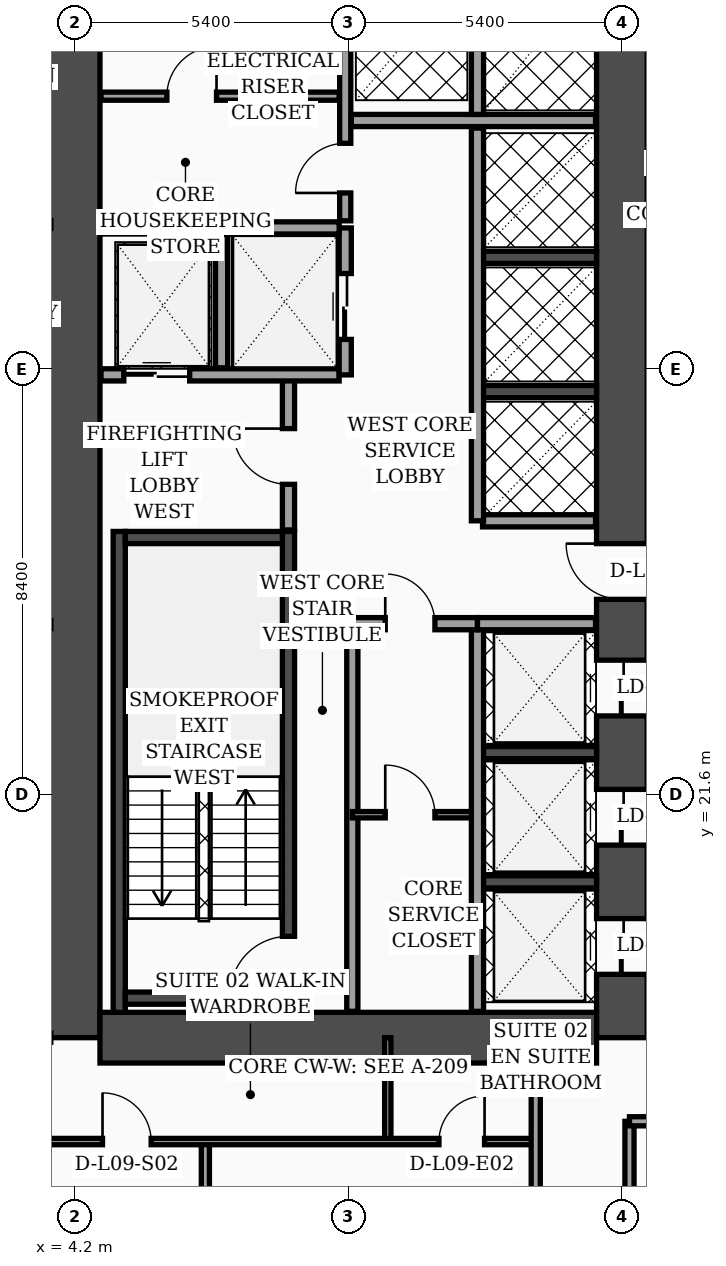
"""IFC4 building model, lengths in metres.
Left out: names, types, materials, properties, quantities, classifications, styles, units other than length and angle.
Written with IfcOpenShell. Run it as: python <this file> out.ifc"""

import sys

from ifc_helpers import new_model, si_unit, direction, frame, frame_2d, origin, place, context, subcontext, project, spatial, rectangle, extrude, element, fill, save


model = new_model("IFC4")
c1 = context("Model", 3, precision=1e-05, world=origin(), true_north=direction((0.0, 1.0)))
c2 = subcontext(c1, "Body", "Model", "MODEL_VIEW")
j1 = project(units=[si_unit("LENGTHUNIT", "METRE"), si_unit("PLANEANGLEUNIT", "RADIAN")], contexts=[c1])
p1 = place(None, origin())
s1 = spatial("IfcSite", under=j1, at=p1, CompositionType="ELEMENT")
p2 = place(p1, origin())
s2 = spatial("IfcBuilding", under=s1, at=p2, CompositionType="ELEMENT")
p3 = place(p2, frame((0.0, 0.0, 42.2)))
s3 = spatial("IfcBuildingStorey", under=s2, at=p3, CompositionType="ELEMENT", Elevation=42.2)
p4 = place(p3, frame((4.2, 16.8, 0.0), z_axis=(0.0, 0.0, 1.0), x_axis=(0.0, 1.0, 0.0)))
e1 = element("IfcWall", 1, at=p4, inside=s3, PredefinedType="SHEAR", context=c2, shape_type="SweptSolid", body=[
    extrude(rectangle(XDim=21.6, YDim=1.0, at=frame_2d((10.8, 0.0))), origin(), (0.0, 0.0, 1.0), 3.52),
])
p5 = place(p3, frame((15.0, 16.8, 0.0), z_axis=(0.0, 0.0, 1.0), x_axis=(0.0, 1.0, 0.0)))
e2 = element("IfcWall", 2, at=p5, inside=s3, PredefinedType="SHEAR", context=c2, shape_type="SweptSolid", body=[
    extrude(rectangle(XDim=21.6, YDim=1.0, at=frame_2d((10.8, 0.0))), origin(), (0.0, 0.0, 1.0), 3.52),
])
p6 = place(p5, frame((8.65, 0.0, 0.0)))
e3 = element("IfcOpeningElement", 3, at=p6, cuts=e2, PredefinedType="OPENING", context=c2, shape_type="SweptSolid", body=[
    extrude(rectangle(XDim=1.1, YDim=2.2, at=frame_2d((0.55, 1.1))), frame((0.0, 0.51, 0.0), z_axis=(0.0, -1.0, 0.0), x_axis=(1.0, 0.0, 0.0)), (0.0, 0.0, 1.0), 1.02),
])
p7 = place(p5, frame((1.25, 0.0, 0.0)))
e4 = element("IfcOpeningElement", 4, at=p7, cuts=e2, PredefinedType="OPENING", context=c2, shape_type="SweptSolid", body=[
    extrude(rectangle(XDim=1.1, YDim=2.2, at=frame_2d((0.55, 1.1))), frame((0.0, 0.51, 0.0), z_axis=(0.0, -1.0, 0.0), x_axis=(1.0, 0.0, 0.0)), (0.0, 0.0, 1.0), 1.02),
])
p8 = place(p5, frame((3.8, 0.0, 0.0)))
e5 = element("IfcOpeningElement", 5, at=p8, cuts=e2, PredefinedType="OPENING", context=c2, shape_type="SweptSolid", body=[
    extrude(rectangle(XDim=1.1, YDim=2.2, at=frame_2d((0.55, 1.1))), frame((0.0, 0.51, 0.0), z_axis=(0.0, -1.0, 0.0), x_axis=(1.0, 0.0, 0.0)), (0.0, 0.0, 1.0), 1.02),
])
p9 = place(p5, frame((6.35, 0.0, 0.0)))
e6 = element("IfcOpeningElement", 6, at=p9, cuts=e2, PredefinedType="OPENING", context=c2, shape_type="SweptSolid", body=[
    extrude(rectangle(XDim=1.1, YDim=2.2, at=frame_2d((0.55, 1.1))), frame((0.0, 0.51, 0.0), z_axis=(0.0, -1.0, 0.0), x_axis=(1.0, 0.0, 0.0)), (0.0, 0.0, 1.0), 1.02),
])
p10 = place(p3, frame((4.7, 16.8, 0.0), z_axis=(0.0, 0.0, 1.0), x_axis=(1.0, 0.0, 0.0)))
e7 = element("IfcWall", 7, at=p10, inside=s3, PredefinedType="SHEAR", context=c2, shape_type="SweptSolid", body=[
    extrude(rectangle(XDim=9.8, YDim=1.0, at=frame_2d((4.9, 0.0))), origin(), (0.0, 0.0, 1.0), 3.52),
])
p11 = place(p3, frame((5.08, 17.3, 0.0), z_axis=(0.0, 0.0, 1.0), x_axis=(0.0, 1.0, 0.0)))
e8 = element("IfcWall", 8, at=p11, inside=s3, PredefinedType="SOLIDWALL", context=c2, shape_type="SweptSolid", body=[
    extrude(rectangle(XDim=9.49, YDim=0.24, at=frame_2d((4.745, 0.0))), origin(), (0.0, 0.0, 1.0), 3.52),
])
p12 = place(p3, frame((8.42, 17.3, 0.0), z_axis=(0.0, 0.0, 1.0), x_axis=(0.0, 1.0, 0.0)))
e9 = element("IfcWall", 9, at=p12, inside=s3, PredefinedType="SOLIDWALL", context=c2, shape_type="SweptSolid", body=[
    extrude(rectangle(XDim=9.49, YDim=0.24, at=frame_2d((4.745, 0.0))), origin(), (0.0, 0.0, 1.0), 3.52),
])
p13 = place(p12, frame((0.35, 0.0, 0.0)))
e10 = element("IfcOpeningElement", 10, at=p13, cuts=e9, PredefinedType="OPENING", context=c2, shape_type="SweptSolid", body=[
    extrude(rectangle(XDim=1.15, YDim=2.2, at=frame_2d((0.575, 1.1))), frame((0.0, 0.13, 0.0), z_axis=(0.0, -1.0, 0.0), x_axis=(1.0, 0.0, 0.0)), (0.0, 0.0, 1.0), 0.26),
])
for number, where, z_axis, x_axis in (
    (11, (5.2, 17.58, 0.0), (0.0, 0.0, 1.0), (1.0, 0.0, 0.0)),
    (12, (5.2, 26.67, 0.0), (0.0, 0.0, 1.0), (1.0, 0.0, 0.0)),
):
    element("IfcWall", number, at=place(p3, frame(where, z_axis=z_axis, x_axis=x_axis)), inside=s3, PredefinedType="SOLIDWALL", context=c2, shape_type="SweptSolid", body=[
        extrude(rectangle(XDim=3.1, YDim=0.24, at=frame_2d((1.55, 0.0))), origin(), (0.0, 0.0, 1.0), 3.52),
    ])
for number, where, z_axis, x_axis in (
    (13, (12.18, 19.875, 0.0), (0.0, 0.0, 1.0), (1.0, 0.0, 0.0)),
    (14, (12.18, 22.425, 0.0), (0.0, 0.0, 1.0), (1.0, 0.0, 0.0)),
    (15, (12.18, 29.55, 0.0), (0.0, 0.0, 1.0), (1.0, 0.0, 0.0)),
    (16, (12.18, 32.2, 0.0), (0.0, 0.0, 1.0), (1.0, 0.0, 0.0)),
):
    element("IfcWall", number, at=place(p3, frame(where, z_axis=z_axis, x_axis=x_axis)), inside=s3, PredefinedType="SOLIDWALL", context=c2, shape_type="SweptSolid", body=[
        extrude(rectangle(XDim=2.32, YDim=0.24, at=frame_2d((1.16, 0.0))), origin(), (0.0, 0.0, 1.0), 3.52),
    ])
p14 = place(p3, frame((8.42, 26.82, 0.0), z_axis=(0.0, 0.0, 1.0), x_axis=(0.0, 1.0, 0.0)))
e17 = element("IfcWall", 17, at=p14, inside=s3, PredefinedType="SOLIDWALL", context=c2, shape_type="SweptSolid", body=[
    extrude(rectangle(XDim=3.0, YDim=0.24, at=frame_2d((1.5, 0.0))), origin(), (0.0, 0.0, 1.0), 3.52),
])
p15 = place(p14, frame((0.9, 0.0, 0.0)))
e18 = element("IfcOpeningElement", 18, at=p15, cuts=e17, PredefinedType="OPENING", context=c2, shape_type="SweptSolid", body=[
    extrude(rectangle(XDim=1.1, YDim=2.2, at=frame_2d((0.55, 1.1))), frame((0.0, 0.13, 0.0), z_axis=(0.0, -1.0, 0.0), x_axis=(1.0, 0.0, 0.0)), (0.0, 0.0, 1.0), 0.26),
])
p16 = place(p3, frame((4.72, 29.88, 0.0), z_axis=(0.0, 0.0, 1.0), x_axis=(1.0, 0.0, 0.0)))
e19 = element("IfcWall", 19, at=p16, inside=s3, PredefinedType="SOLIDWALL", context=c2, shape_type="SweptSolid", body=[
    extrude(rectangle(XDim=4.7, YDim=0.24, at=frame_2d((2.35, 0.0))), origin(), (0.0, 0.0, 1.0), 3.52),
])
p17 = place(p16, frame((0.45, 0.0, 0.0)))
e20 = element("IfcOpeningElement", 20, at=p17, cuts=e19, PredefinedType="OPENING", context=c2, shape_type="SweptSolid", body=[
    extrude(rectangle(XDim=1.3, YDim=2.35, at=frame_2d((0.65, 1.175))), frame((0.0, 0.13, 0.0), z_axis=(0.0, -1.0, 0.0), x_axis=(1.0, 0.0, 0.0)), (0.0, 0.0, 1.0), 0.26),
])
p18 = place(p3, frame((7.1, 30.02, 0.0), z_axis=(0.0, 0.0, 1.0), x_axis=(0.0, 1.0, 0.0)))
e21 = element("IfcWall", 21, at=p18, inside=s3, PredefinedType="SOLIDWALL", context=c2, shape_type="SweptSolid", body=[
    extrude(rectangle(XDim=2.63, YDim=0.24, at=frame_2d((1.315, 0.0))), origin(), (0.0, 0.0, 1.0), 3.52),
])
p19 = place(p3, frame((9.54, 29.88, 0.0), z_axis=(0.0, 0.0, 1.0), x_axis=(0.0, 1.0, 0.0)))
e22 = element("IfcWall", 22, at=p19, inside=s3, PredefinedType="SOLIDWALL", context=c2, shape_type="SweptSolid", body=[
    extrude(rectangle(XDim=2.9, YDim=0.24, at=frame_2d((1.45, 0.0))), origin(), (0.0, 0.0, 1.0), 3.52),
])
p20 = place(p19, frame((0.7, 0.0, 0.0)))
e23 = element("IfcOpeningElement", 23, at=p20, cuts=e22, PredefinedType="OPENING", context=c2, shape_type="SweptSolid", body=[
    extrude(rectangle(XDim=1.3, YDim=2.35, at=frame_2d((0.65, 1.175))), frame((0.0, 0.13, 0.0), z_axis=(0.0, -1.0, 0.0), x_axis=(1.0, 0.0, 0.0)), (0.0, 0.0, 1.0), 0.26),
])
p21 = place(p3, frame((4.72, 32.78, 0.0), z_axis=(0.0, 0.0, 1.0), x_axis=(1.0, 0.0, 0.0)))
e24 = element("IfcWall", 24, at=p21, inside=s3, PredefinedType="SOLIDWALL", context=c2, shape_type="SweptSolid", body=[
    extrude(rectangle(XDim=4.7, YDim=0.24, at=frame_2d((2.35, 0.0))), origin(), (0.0, 0.0, 1.0), 3.52),
])
p22 = place(p3, frame((9.68, 17.32, 0.0), z_axis=(0.0, 0.0, 1.0), x_axis=(0.0, 1.0, 0.0)))
e25 = element("IfcWall", 25, at=p22, inside=s3, PredefinedType="SOLIDWALL", context=c2, shape_type="SweptSolid", body=[
    extrude(rectangle(XDim=7.68, YDim=0.22, at=frame_2d((3.84, 0.0))), origin(), (0.0, 0.0, 1.0), 3.52),
])
p23 = place(p3, frame((4.72, 35.38, 0.0), z_axis=(0.0, 0.0, 1.0), x_axis=(1.0, 0.0, 0.0)))
e26 = element("IfcWall", 26, at=p23, inside=s3, PredefinedType="PARTITIONING", context=c2, shape_type="SweptSolid", body=[
    extrude(rectangle(XDim=4.7, YDim=0.16, at=frame_2d((2.35, 0.0))), origin(), (0.0, 0.0, 1.0), 3.52),
])
p24 = place(p23, frame((1.3, 0.0, 0.0)))
e27 = element("IfcOpeningElement", 27, at=p24, cuts=e26, PredefinedType="OPENING", context=c2, shape_type="SweptSolid", body=[
    extrude(rectangle(XDim=0.98, YDim=2.15, at=frame_2d((0.49, 1.075))), frame((0.0, 0.09, 0.0), z_axis=(0.0, -1.0, 0.0), x_axis=(1.0, 0.0, 0.0)), (0.0, 0.0, 1.0), 0.18),
])
p25 = place(p3, frame((9.54, 32.92, 0.0), z_axis=(0.0, 0.0, 1.0), x_axis=(0.0, 1.0, 0.0)))
e28 = element("IfcWall", 28, at=p25, inside=s3, PredefinedType="SOLIDWALL", context=c2, shape_type="SweptSolid", body=[
    extrude(rectangle(XDim=4.96, YDim=0.22, at=frame_2d((2.48, 0.0))), origin(), (0.0, 0.0, 1.0), 3.52),
])
p26 = place(p25, frame((0.55, 0.0, 0.0)))
e29 = element("IfcOpeningElement", 29, at=p26, cuts=e28, PredefinedType="OPENING", context=c2, shape_type="SweptSolid", body=[
    extrude(rectangle(XDim=0.98, YDim=2.15, at=frame_2d((0.49, 1.075))), frame((0.0, 0.12, 0.0), z_axis=(0.0, -1.0, 0.0), x_axis=(1.0, 0.0, 0.0)), (0.0, 0.0, 1.0), 0.24),
])
p27 = place(p3, frame((9.68, 21.2, 0.0), z_axis=(0.0, 0.0, 1.0), x_axis=(1.0, 0.0, 0.0)))
e30 = element("IfcWall", 30, at=p27, inside=s3, PredefinedType="PARTITIONING", context=c2, shape_type="SweptSolid", body=[
    extrude(rectangle(XDim=2.47, YDim=0.125, at=frame_2d((1.235, 0.0))), origin(), (0.0, 0.0, 1.0), 3.52),
])
p28 = place(p27, frame((0.65, 0.0, 0.0)))
e31 = element("IfcOpeningElement", 31, at=p28, cuts=e30, PredefinedType="OPENING", context=c2, shape_type="SweptSolid", body=[
    extrude(rectangle(XDim=0.98, YDim=2.15, at=frame_2d((0.49, 1.075))), frame((0.0, 0.073, 0.0), z_axis=(0.0, -1.0, 0.0), x_axis=(1.0, 0.0, 0.0)), (0.0, 0.0, 1.0), 0.145),
])
p29 = place(p3, frame((12.15, 17.32, 0.0), z_axis=(0.0, 0.0, 1.0), x_axis=(0.0, 1.0, 0.0)))
e32 = element("IfcWall", 32, at=p29, inside=s3, PredefinedType="SOLIDWALL", context=c2, shape_type="SweptSolid", body=[
    extrude(rectangle(XDim=7.65, YDim=0.24, at=frame_2d((3.825, 0.0))), origin(), (0.0, 0.0, 1.0), 3.52),
])
p30 = place(p3, frame((9.68, 24.97, 0.0), z_axis=(0.0, 0.0, 1.0), x_axis=(1.0, 0.0, 0.0)))
e33 = element("IfcWall", 33, at=p30, inside=s3, PredefinedType="SOLIDWALL", context=c2, shape_type="SweptSolid", body=[
    extrude(rectangle(XDim=2.47, YDim=0.24, at=frame_2d((1.235, 0.0))), origin(), (0.0, 0.0, 1.0), 3.52),
])
p31 = place(p30, frame((0.65, 0.0, 0.0)))
e34 = element("IfcOpeningElement", 34, at=p31, cuts=e33, PredefinedType="OPENING", context=c2, shape_type="SweptSolid", body=[
    extrude(rectangle(XDim=0.98, YDim=2.15, at=frame_2d((0.49, 1.075))), frame((0.0, 0.13, 0.0), z_axis=(0.0, -1.0, 0.0), x_axis=(1.0, 0.0, 0.0)), (0.0, 0.0, 1.0), 0.26),
])
p32 = place(p3, frame((12.15, 24.97, 0.0), z_axis=(0.0, 0.0, 1.0), x_axis=(1.0, 0.0, 0.0)))
e35 = element("IfcWall", 35, at=p32, inside=s3, PredefinedType="SOLIDWALL", context=c2, shape_type="SweptSolid", body=[
    extrude(rectangle(XDim=2.33, YDim=0.24, at=frame_2d((1.165, 0.0))), origin(), (0.0, 0.0, 1.0), 2.82),
])
p33 = place(p3, frame((12.25, 27.0, 0.0), z_axis=(0.0, 0.0, 1.0), x_axis=(1.0, 0.0, 0.0)))
e36 = element("IfcWall", 36, at=p33, inside=s3, PredefinedType="SOLIDWALL", context=c2, shape_type="SweptSolid", body=[
    extrude(rectangle(XDim=2.23, YDim=0.24, at=frame_2d((1.115, 0.0))), origin(), (0.0, 0.0, 1.0), 3.52),
])
p34 = place(p3, frame((12.15, 27.0, 0.0), z_axis=(0.0, 0.0, 1.0), x_axis=(0.0, 1.0, 0.0)))
e37 = element("IfcWall", 37, at=p34, inside=s3, PredefinedType="SOLIDWALL", context=c2, shape_type="SweptSolid", body=[
    extrude(rectangle(XDim=7.75, YDim=0.24, at=frame_2d((3.875, 0.0))), origin(), (0.0, 0.0, 1.0), 3.52),
])
p35 = place(p3, frame((9.66, 34.9, 0.0), z_axis=(0.0, 0.0, 1.0), x_axis=(1.0, 0.0, 0.0)))
e38 = element("IfcWall", 38, at=p35, inside=s3, PredefinedType="SOLIDWALL", context=c2, shape_type="SweptSolid", body=[
    extrude(rectangle(XDim=4.82, YDim=0.24, at=frame_2d((2.41, 0.0))), origin(), (0.0, 0.0, 1.0), 3.52),
])
p36 = place(p3, frame((12.15, 35.02, 0.0), z_axis=(0.0, 0.0, 1.0), x_axis=(0.0, 1.0, 0.0)))
e39 = element("IfcWall", 39, at=p36, inside=s3, PredefinedType="SOLIDWALL", context=c2, shape_type="SweptSolid", body=[
    extrude(rectangle(XDim=2.86, YDim=0.24, at=frame_2d((1.43, 0.0))), origin(), (0.0, 0.0, 1.0), 3.52),
])
p37 = place(p3, frame((10.38, 14.75, 0.0), z_axis=(0.0, 0.0, 1.0), x_axis=(0.0, 1.0, 0.0)))
e40 = element("IfcWall", 40, at=p37, inside=s3, PredefinedType="PARTITIONING", context=c2, shape_type="SweptSolid", body=[
    extrude(rectangle(XDim=2.05, YDim=0.125, at=frame_2d((1.025, 0.0))), origin(), (0.0, 0.0, 1.0), 3.52),
])
p38 = place(p3, frame((6.78, 11.35, 0.0), z_axis=(0.0, 0.0, 1.0), x_axis=(0.0, 1.0, 0.0)))
e41 = element("IfcWall", 41, at=p38, inside=s3, PredefinedType="PARTITIONING", context=c2, shape_type="SweptSolid", body=[
    extrude(rectangle(XDim=3.4, YDim=0.16, at=frame_2d((1.7, 0.0))), origin(), (0.0, 0.0, 1.0), 3.52),
])
p39 = place(p38, frame((1.22, 0.0, 0.0)))
e42 = element("IfcOpeningElement", 42, at=p39, cuts=e41, PredefinedType="OPENING", context=c2, shape_type="SweptSolid", body=[
    extrude(rectangle(XDim=0.96, YDim=2.2, at=frame_2d((0.48, 1.1))), frame((0.0, 0.09, 0.0), z_axis=(0.0, -1.0, 0.0), x_axis=(1.0, 0.0, 0.0)), (0.0, 0.0, 1.0), 0.18),
])
p40 = place(p3, frame((0.08, 14.75, 0.0), z_axis=(0.0, 0.0, 1.0), x_axis=(1.0, 0.0, 0.0)))
e43 = element("IfcWall", 43, at=p40, inside=s3, PredefinedType="PARTITIONING", context=c2, shape_type="SweptSolid", body=[
    extrude(rectangle(XDim=13.22, YDim=0.125, at=frame_2d((6.61, 0.0))), origin(), (0.0, 0.0, 1.0), 2.82),
])
p41 = place(p40, frame((4.67, 0.0, 0.0)))
e44 = element("IfcOpeningElement", 44, at=p41, cuts=e43, PredefinedType="OPENING", context=c2, shape_type="SweptSolid", body=[
    extrude(rectangle(XDim=0.96, YDim=2.2, at=frame_2d((0.48, 1.1))), frame((0.0, 0.073, 0.0), z_axis=(0.0, -1.0, 0.0), x_axis=(1.0, 0.0, 0.0)), (0.0, 0.0, 1.0), 0.145),
])
p42 = place(p40, frame((11.31, 0.0, 0.0)))
e45 = element("IfcOpeningElement", 45, at=p42, cuts=e43, PredefinedType="OPENING", context=c2, shape_type="SweptSolid", body=[
    extrude(rectangle(XDim=0.9, YDim=2.15, at=frame_2d((0.45, 1.075))), frame((0.0, 0.073, 0.0), z_axis=(0.0, -1.0, 0.0), x_axis=(1.0, 0.0, 0.0)), (0.0, 0.0, 1.0), 0.145),
])
p43 = place(p3, frame((13.3, 2.44, 0.0), z_axis=(0.0, 0.0, 1.0), x_axis=(0.0, 1.0, 0.0)))
e46 = element("IfcWall", 46, at=p43, inside=s3, PredefinedType="PARTITIONING", context=c2, shape_type="SweptSolid", body=[
    extrude(rectangle(XDim=14.36, YDim=0.18, at=frame_2d((7.18, 0.0))), origin(), (0.0, 0.0, 1.0), 3.02),
])
p44 = place(p43, frame((3.01, 0.0, 0.0)))
e47 = element("IfcOpeningElement", 47, at=p44, cuts=e46, PredefinedType="OPENING", context=c2, shape_type="SweptSolid", body=[
    extrude(rectangle(XDim=1.02, YDim=2.2, at=frame_2d((0.51, 1.1))), frame((0.0, 0.1, 0.0), z_axis=(0.0, -1.0, 0.0), x_axis=(1.0, 0.0, 0.0)), (0.0, 0.0, 1.0), 0.2),
])
p45 = place(p43, frame((10.1, 0.0, 0.0)))
e48 = element("IfcOpeningElement", 48, at=p45, cuts=e46, PredefinedType="OPENING", context=c2, shape_type="SweptSolid", body=[
    extrude(rectangle(XDim=1.02, YDim=2.2, at=frame_2d((0.51, 1.1))), frame((0.0, 0.1, 0.0), z_axis=(0.0, -1.0, 0.0), x_axis=(1.0, 0.0, 0.0)), (0.0, 0.0, 1.0), 0.2),
])
p46 = place(p3, frame((15.15, 2.44, 0.0), z_axis=(0.0, 0.0, 1.0), x_axis=(0.0, 1.0, 0.0)))
e49 = element("IfcWall", 49, at=p46, inside=s3, PredefinedType="PARTITIONING", context=c2, shape_type="SweptSolid", body=[
    extrude(rectangle(XDim=12.71, YDim=0.18, at=frame_2d((6.355, 0.0))), origin(), (0.0, 0.0, 1.0), 3.02),
])
p47 = place(p3, frame((15.15, 15.15, 0.0), z_axis=(0.0, 0.0, 1.0), x_axis=(1.0, 0.0, 0.0)))
e50 = element("IfcWall", 50, at=p47, inside=s3, PredefinedType="PARTITIONING", context=c2, shape_type="SweptSolid", body=[
    extrude(rectangle(XDim=6.45, YDim=0.18, at=frame_2d((3.225, 0.0))), origin(), (0.0, 0.0, 1.0), 2.32),
])
p48 = place(p47, frame((1.74, 0.0, 0.0)))
e51 = element("IfcOpeningElement", 51, at=p48, cuts=e50, PredefinedType="OPENING", context=c2, shape_type="SweptSolid", body=[
    extrude(rectangle(XDim=1.02, YDim=2.2, at=frame_2d((0.51, 1.1))), frame((0.0, 0.1, 0.0), z_axis=(0.0, -1.0, 0.0), x_axis=(1.0, 0.0, 0.0)), (0.0, 0.0, 1.0), 0.2),
])
p49 = place(p15, origin())
e52 = element("IfcDoor", 52, at=p49, inside=s3, OperationType="SINGLE_SWING_RIGHT", PredefinedType="DOOR", context=c2, shape_type="SweptSolid", body=[
    extrude(rectangle(XDim=1.1, YDim=2.2, at=frame_2d((0.55, 1.1))), frame((0.0, 0.025, 0.0), z_axis=(0.0, -1.0, 0.0), x_axis=(1.0, 0.0, 0.0)), (0.0, 0.0, 1.0), 0.05),
])
fill(e18, e52)
p50 = place(p17, origin())
e53 = element("IfcDoor", 53, at=p50, inside=s3, OperationType="DOUBLE_DOOR_SLIDING", PredefinedType="DOOR", context=c2, shape_type="SweptSolid", body=[
    extrude(rectangle(XDim=1.3, YDim=2.35, at=frame_2d((0.65, 1.175))), frame((0.0, 0.025, 0.0), z_axis=(0.0, -1.0, 0.0), x_axis=(1.0, 0.0, 0.0)), (0.0, 0.0, 1.0), 0.05),
])
fill(e20, e53)
p51 = place(p20, origin())
e54 = element("IfcDoor", 54, at=p51, inside=s3, OperationType="DOUBLE_DOOR_SLIDING", PredefinedType="DOOR", context=c2, shape_type="SweptSolid", body=[
    extrude(rectangle(XDim=1.3, YDim=2.35, at=frame_2d((0.65, 1.175))), frame((0.0, 0.025, 0.0), z_axis=(0.0, -1.0, 0.0), x_axis=(1.0, 0.0, 0.0)), (0.0, 0.0, 1.0), 0.05),
])
fill(e23, e54)
p52 = place(p24, origin())
e55 = element("IfcDoor", 55, at=p52, inside=s3, OperationType="SINGLE_SWING_RIGHT", PredefinedType="DOOR", context=c2, shape_type="SweptSolid", body=[
    extrude(rectangle(XDim=0.98, YDim=2.15, at=frame_2d((0.49, 1.075))), frame((0.0, 0.025, 0.0), z_axis=(0.0, -1.0, 0.0), x_axis=(1.0, 0.0, 0.0)), (0.0, 0.0, 1.0), 0.05),
])
fill(e27, e55)
p53 = place(p26, origin())
e56 = element("IfcDoor", 56, at=p53, inside=s3, OperationType="SINGLE_SWING_LEFT", PredefinedType="DOOR", context=c2, shape_type="SweptSolid", body=[
    extrude(rectangle(XDim=0.98, YDim=2.15, at=frame_2d((0.49, 1.075))), frame((0.0, 0.025, 0.0), z_axis=(0.0, -1.0, 0.0), x_axis=(1.0, 0.0, 0.0)), (0.0, 0.0, 1.0), 0.05),
])
fill(e29, e56)
p54 = place(p28, origin())
e57 = element("IfcDoor", 57, at=p54, inside=s3, OperationType="SINGLE_SWING_LEFT", PredefinedType="DOOR", context=c2, shape_type="SweptSolid", body=[
    extrude(rectangle(XDim=0.98, YDim=2.15, at=frame_2d((0.49, 1.075))), frame((0.0, 0.025, 0.0), z_axis=(0.0, -1.0, 0.0), x_axis=(1.0, 0.0, 0.0)), (0.0, 0.0, 1.0), 0.05),
])
fill(e31, e57)
p55 = place(p31, origin())
e58 = element("IfcDoor", 58, at=p55, inside=s3, OperationType="SINGLE_SWING_LEFT", PredefinedType="DOOR", context=c2, shape_type="SweptSolid", body=[
    extrude(rectangle(XDim=0.98, YDim=2.15, at=frame_2d((0.49, 1.075))), frame((0.0, 0.025, 0.0), z_axis=(0.0, -1.0, 0.0), x_axis=(1.0, 0.0, 0.0)), (0.0, 0.0, 1.0), 0.05),
])
fill(e34, e58)
p56 = place(p41, origin())
e59 = element("IfcDoor", 59, at=p56, inside=s3, OperationType="SINGLE_SWING_LEFT", PredefinedType="DOOR", context=c2, shape_type="SweptSolid", body=[
    extrude(rectangle(XDim=0.96, YDim=2.2, at=frame_2d((0.48, 1.1))), frame((0.0, 0.025, 0.0), z_axis=(0.0, -1.0, 0.0), x_axis=(1.0, 0.0, 0.0)), (0.0, 0.0, 1.0), 0.05),
])
fill(e44, e59)
p57 = place(p42, origin())
e60 = element("IfcDoor", 60, at=p57, inside=s3, OperationType="SINGLE_SWING_RIGHT", PredefinedType="DOOR", context=c2, shape_type="SweptSolid", body=[
    extrude(rectangle(XDim=0.9, YDim=2.15, at=frame_2d((0.45, 1.075))), frame((0.0, 0.025, 0.0), z_axis=(0.0, -1.0, 0.0), x_axis=(1.0, 0.0, 0.0)), (0.0, 0.0, 1.0), 0.05),
])
fill(e45, e60)
p58 = place(p13, origin())
e61 = element("IfcDoor", 61, at=p58, inside=s3, OperationType="SINGLE_SWING_LEFT", PredefinedType="DOOR", context=c2, shape_type="SweptSolid", body=[
    extrude(rectangle(XDim=1.15, YDim=2.2, at=frame_2d((0.575, 1.1))), frame((0.0, 0.025, 0.0), z_axis=(0.0, -1.0, 0.0), x_axis=(1.0, 0.0, 0.0)), (0.0, 0.0, 1.0), 0.05),
])
fill(e10, e61)
p59 = place(p6, origin())
e62 = element("IfcDoor", 62, at=p59, inside=s3, OperationType="SINGLE_SWING_RIGHT", PredefinedType="DOOR", context=c2, shape_type="SweptSolid", body=[
    extrude(rectangle(XDim=1.1, YDim=2.2, at=frame_2d((0.55, 1.1))), frame((0.0, 0.025, 0.0), z_axis=(0.0, -1.0, 0.0), x_axis=(1.0, 0.0, 0.0)), (0.0, 0.0, 1.0), 0.05),
])
fill(e3, e62)
p60 = place(p7, origin())
e63 = element("IfcDoor", 63, at=p60, inside=s3, OperationType="DOUBLE_DOOR_SLIDING", PredefinedType="DOOR", context=c2, shape_type="SweptSolid", body=[
    extrude(rectangle(XDim=1.1, YDim=2.2, at=frame_2d((0.55, 1.1))), frame((0.0, 0.025, 0.0), z_axis=(0.0, -1.0, 0.0), x_axis=(1.0, 0.0, 0.0)), (0.0, 0.0, 1.0), 0.05),
])
fill(e4, e63)
p61 = place(p8, origin())
e64 = element("IfcDoor", 64, at=p61, inside=s3, OperationType="DOUBLE_DOOR_SLIDING", PredefinedType="DOOR", context=c2, shape_type="SweptSolid", body=[
    extrude(rectangle(XDim=1.1, YDim=2.2, at=frame_2d((0.55, 1.1))), frame((0.0, 0.025, 0.0), z_axis=(0.0, -1.0, 0.0), x_axis=(1.0, 0.0, 0.0)), (0.0, 0.0, 1.0), 0.05),
])
fill(e5, e64)
p62 = place(p9, origin())
e65 = element("IfcDoor", 65, at=p62, inside=s3, OperationType="DOUBLE_DOOR_SLIDING", PredefinedType="DOOR", context=c2, shape_type="SweptSolid", body=[
    extrude(rectangle(XDim=1.1, YDim=2.2, at=frame_2d((0.55, 1.1))), frame((0.0, 0.025, 0.0), z_axis=(0.0, -1.0, 0.0), x_axis=(1.0, 0.0, 0.0)), (0.0, 0.0, 1.0), 0.05),
])
fill(e6, e65)
save(model, sys.argv[1])
